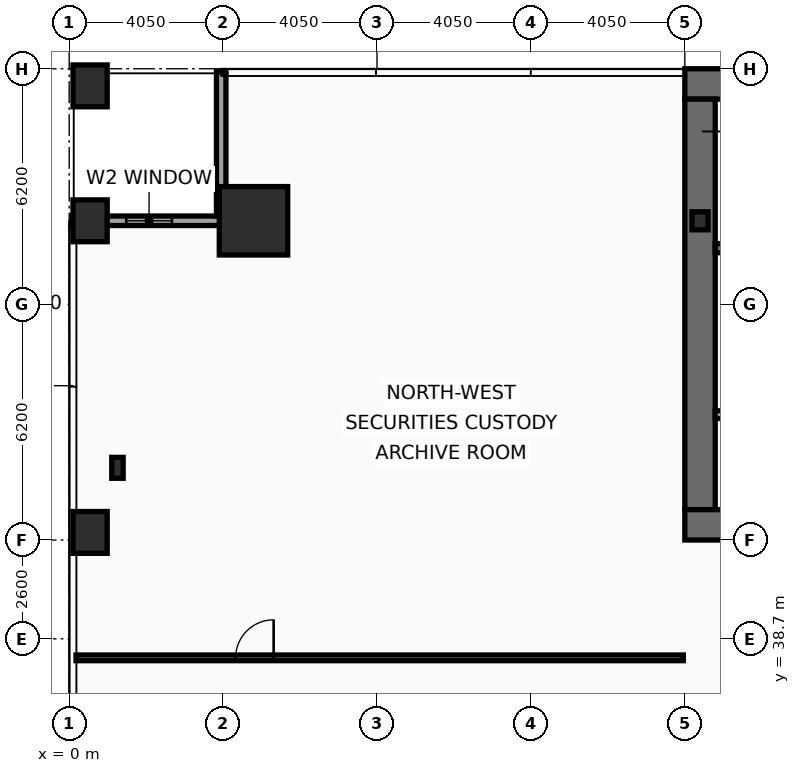
"""IFC4 building model, lengths in metres.
Left out: names, types, materials, properties, quantities, classifications, styles, units other than length and angle.
Written with IfcOpenShell. Run it as: python <this file> out.ifc"""

import sys

from ifc_helpers import new_model, si_unit, direction, frame, frame_2d, origin, origin_2d, place, context, subcontext, project, spatial, rectangle, hollow_rectangle, i_section, extrude, element, fill, save


model = new_model("IFC4")
c1 = context("Model", 3, precision=1e-05, world=origin(), true_north=direction((0.0, 1.0)))
c2 = subcontext(c1, "Body", "Model", "MODEL_VIEW")
j1 = project(units=[si_unit("LENGTHUNIT", "METRE"), si_unit("PLANEANGLEUNIT", "RADIAN")], contexts=[c1])
p1 = place(None, origin())
s1 = spatial("IfcSite", under=j1, at=p1, CompositionType="ELEMENT")
p2 = place(p1, origin())
s2 = spatial("IfcBuilding", under=s1, at=p2, CompositionType="ELEMENT")
p3 = place(p2, frame((0.0, 0.0, 5.4)))
s3 = spatial("IfcBuildingStorey", under=s2, at=p3, CompositionType="ELEMENT", Elevation=5.4)
p4 = place(p3, frame((16.2, 53.3, 0.0), z_axis=(0.0, 0.0, 1.0), x_axis=(1.0, 0.0, 0.0)))
e1 = element("IfcWall", 1, at=p4, inside=s3, PredefinedType="SHEAR", context=c2, shape_type="SweptSolid", body=[
    extrude(rectangle(XDim=40.5, YDim=0.8, at=frame_2d((20.25, 0.0))), origin(), (0.0, 0.0, 1.0), 4.8),
])
p5 = place(p3, frame((16.6, 42.1, 0.0), z_axis=(0.0, 0.0, 1.0), x_axis=(0.0, 1.0, 0.0)))
e2 = element("IfcWall", 2, at=p5, inside=s3, PredefinedType="SHEAR", context=c2, shape_type="SweptSolid", body=[
    extrude(rectangle(XDim=10.8, YDim=0.8, at=frame_2d((5.4, 0.0))), origin(), (0.0, 0.0, 1.0), 4.8),
])
p6 = place(p3, frame((18.65, 41.7, 0.0), z_axis=(0.0, 0.0, 1.0), x_axis=(-1.0, 0.0, 0.0)))
e3 = element("IfcWall", 3, at=p6, inside=s3, PredefinedType="SHEAR", context=c2, shape_type="SweptSolid", body=[
    extrude(rectangle(XDim=2.45, YDim=0.8, at=frame_2d((1.225, 0.0))), origin(), (0.0, 0.0, 1.0), 4.8),
])
p7 = place(p3, frame((17.0, 48.98, 0.0), z_axis=(0.0, 0.0, 1.0), x_axis=(1.0, 0.0, 0.0)))
e4 = element("IfcWall", 4, at=p7, inside=s3, PredefinedType="SHEAR", context=c2, shape_type="SweptSolid", body=[
    extrude(rectangle(XDim=7.22, YDim=0.24, at=frame_2d((3.61, 0.0))), origin(), (0.0, 0.0, 1.0), 4.8),
])
p8 = place(p7, frame((0.22, 0.0, 0.0)))
e5 = element("IfcOpeningElement", 5, at=p8, cuts=e4, PredefinedType="OPENING", context=c2, shape_type="SweptSolid", body=[
    extrude(rectangle(XDim=1.05, YDim=2.15, at=frame_2d((0.525, 1.075))), frame((0.0, 0.13, 0.0), z_axis=(0.0, -1.0, 0.0), x_axis=(1.0, 0.0, 0.0)), (0.0, 0.0, 1.0), 0.26),
])
p9 = place(p3, frame((4.85, 49.7, 0.0), z_axis=(0.0, 0.0, 1.0), x_axis=(1.0, 0.0, 0.0)))
e6 = element("IfcColumn", 6, at=p9, inside=s3, PredefinedType="COLUMN", context=c2, shape_type="SweptSolid", body=[
    extrude(hollow_rectangle(XDim=1.8, YDim=1.8, WallThickness=0.08, at=origin_2d()), origin(), (0.0, 0.0, 1.0), 5.0),
])
p10 = place(p3, frame((1.27, 43.2, 0.0), z_axis=(0.0, 0.0, 1.0), x_axis=(1.0, 0.0, 0.0)))
e7 = element("IfcColumn", 7, at=p10, inside=s3, PredefinedType="COLUMN", context=c2, shape_type="SweptSolid", body=[
    extrude(i_section(OverallWidth=0.3, OverallDepth=0.55, WebThickness=0.015, FlangeThickness=0.029, at=origin_2d()), origin(), (0.0, 0.0, 1.0), 5.0),
])
p11 = place(p3, frame((16.6, 49.7, 0.0), z_axis=(0.0, 0.0, 1.0), x_axis=(1.0, 0.0, 0.0)))
e8 = element("IfcColumn", 8, at=p11, inside=s3, PredefinedType="COLUMN", context=c2, shape_type="SweptSolid", body=[
    extrude(i_section(OverallWidth=0.424, OverallDepth=0.474, WebThickness=0.048, FlangeThickness=0.077, at=origin_2d()), origin(), (0.0, 0.0, 1.0), 5.0),
])
for number, where, z_axis, x_axis in (
    (9, (0.55, 49.7, 0.0), (0.0, 0.0, 1.0), (1.0, 0.0, 0.0)),
    (10, (0.55, 53.25, 0.0), (0.0, 0.0, 1.0), (1.0, 0.0, 0.0)),
    (11, (0.55, 41.5, 0.0), (0.0, 0.0, 1.0), (1.0, 0.0, 0.0)),
):
    element("IfcColumn", number, at=place(p3, frame(where, z_axis=z_axis, x_axis=x_axis)), inside=s3, PredefinedType="PILASTER", context=c2, shape_type="SweptSolid", body=[
        extrude(rectangle(XDim=0.9, YDim=1.1, at=origin_2d()), origin(), (0.0, 0.0, 1.0), 5.0),
    ])
p12 = place(p3, frame((0.08, 49.7, 0.0), z_axis=(0.0, 0.0, 1.0), x_axis=(1.0, 0.0, 0.0)))
e12 = element("IfcWall", 12, at=p12, inside=s3, PredefinedType="SOLIDWALL", context=c2, shape_type="SweptSolid", body=[
    extrude(rectangle(XDim=4.045, YDim=0.25, at=frame_2d((2.022, 0.0))), origin(), (0.0, 0.0, 1.0), 4.14),
])
p13 = place(p12, frame((1.423, 0.0, 0.9)))
e13 = element("IfcOpeningElement", 13, at=p13, cuts=e12, PredefinedType="OPENING", context=c2, shape_type="SweptSolid", body=[
    extrude(rectangle(XDim=1.2, YDim=2.8, at=frame_2d((0.6, 1.4))), frame((0.0, 0.135, 0.0), z_axis=(0.0, -1.0, 0.0), x_axis=(1.0, 0.0, 0.0)), (0.0, 0.0, 1.0), 0.27),
])
p14 = place(p3, frame((4.0, 49.825, 0.0), z_axis=(0.0, 0.0, 1.0), x_axis=(0.0, 1.0, 0.0)))
e14 = element("IfcWall", 14, at=p14, inside=s3, PredefinedType="SOLIDWALL", context=c2, shape_type="SweptSolid", body=[
    extrude(rectangle(XDim=3.795, YDim=0.25, at=frame_2d((1.897, 0.0))), origin(), (0.0, 0.0, 1.0), 4.14),
])
p15 = place(p3, frame((17.0, 44.6, 0.0), z_axis=(0.0, 0.0, 1.0), x_axis=(1.0, 0.0, 0.0)))
e15 = element("IfcWall", 15, at=p15, inside=s3, PredefinedType="PARTITIONING", context=c2, shape_type="SweptSolid", body=[
    extrude(rectangle(XDim=4.0, YDim=0.2, at=frame_2d((2.0, 0.0))), origin(), (0.0, 0.0, 1.0), 4.8),
])
p16 = place(p15, frame((1.25, 0.0, 0.0)))
e16 = element("IfcOpeningElement", 16, at=p16, cuts=e15, PredefinedType="OPENING", context=c2, shape_type="SweptSolid", body=[
    extrude(rectangle(XDim=1.05, YDim=2.15, at=frame_2d((0.525, 1.075))), frame((0.0, 0.11, 0.0), z_axis=(0.0, -1.0, 0.0), x_axis=(1.0, 0.0, 0.0)), (0.0, 0.0, 1.0), 0.22),
])
p17 = place(p3, frame((0.18, 38.2, 0.0), z_axis=(0.0, 0.0, 1.0), x_axis=(1.0, 0.0, 0.0)))
e17 = element("IfcWall", 17, at=p17, inside=s3, PredefinedType="PARTITIONING", context=c2, shape_type="SweptSolid", body=[
    extrude(rectangle(XDim=15.98, YDim=0.15, at=frame_2d((7.99, 0.0))), origin(), (0.0, 0.0, 1.0), 4.14),
])
p18 = place(p17, frame((4.2, 0.0, 0.0)))
e18 = element("IfcOpeningElement", 18, at=p18, cuts=e17, PredefinedType="OPENING", context=c2, shape_type="SweptSolid", body=[
    extrude(rectangle(XDim=1.0, YDim=2.05, at=frame_2d((0.5, 1.025))), frame((0.0, 0.085, 0.0), z_axis=(0.0, -1.0, 0.0), x_axis=(1.0, 0.0, 0.0)), (0.0, 0.0, 1.0), 0.17),
])
p19 = place(p13, origin())
e19 = element("IfcWindow", 19, at=p19, inside=s3, PartitioningType="SINGLE_PANEL", PredefinedType="WINDOW", context=c2, shape_type="SweptSolid", body=[
    extrude(rectangle(XDim=1.2, YDim=2.8, at=frame_2d((0.6, 1.4))), frame((0.0, 0.03, 0.0), z_axis=(0.0, -1.0, 0.0), x_axis=(1.0, 0.0, 0.0)), (0.0, 0.0, 1.0), 0.06),
])
fill(e13, e19)
p20 = place(p18, origin())
e20 = element("IfcDoor", 20, at=p20, inside=s3, OperationType="SINGLE_SWING_RIGHT", PredefinedType="DOOR", context=c2, shape_type="SweptSolid", body=[
    extrude(rectangle(XDim=1.0, YDim=2.05, at=frame_2d((0.5, 1.025))), frame((0.0, 0.025, 0.0), z_axis=(0.0, -1.0, 0.0), x_axis=(1.0, 0.0, 0.0)), (0.0, 0.0, 1.0), 0.05),
])
fill(e18, e20)
save(model, sys.argv[1])
